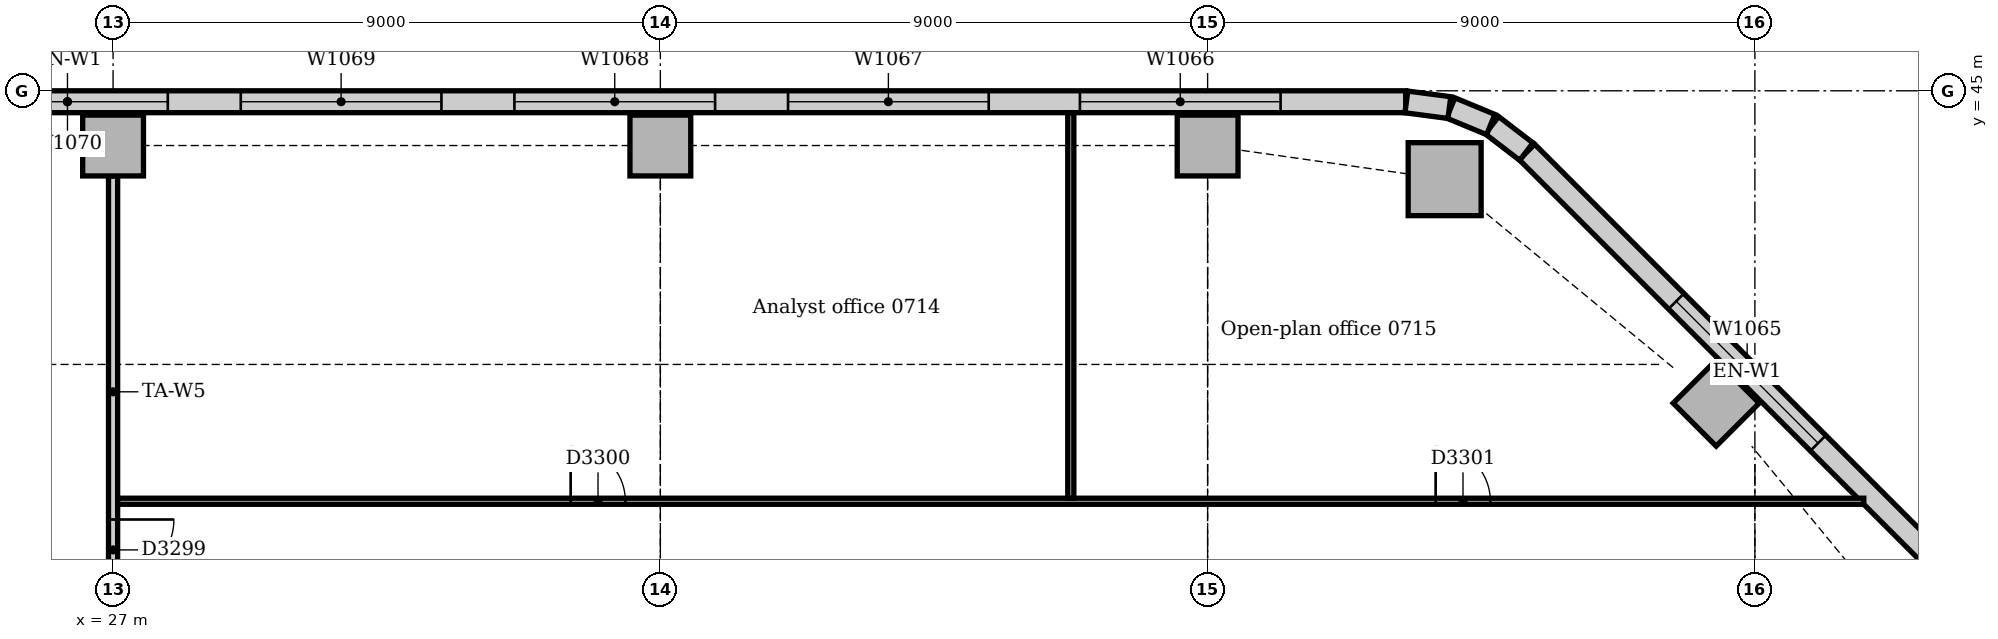
"""IFC4 building model, lengths in metres.
Left out: names, types, materials, properties, quantities, classifications, styles, units other than length and angle.
Written with IfcOpenShell. Run it as: python <this file> out.ifc"""

import sys

from ifc_helpers import new_model, si_unit, direction, frame, frame_2d, origin, origin_2d, place, context, subcontext, project, spatial, rectangle, extrude, element, fill, save


model = new_model("IFC4")
c1 = context("Model", 3, precision=1e-05, world=origin(), true_north=direction((0.0, 1.0)))
c2 = subcontext(c1, "Body", "Model", "MODEL_VIEW")
j1 = project(units=[si_unit("LENGTHUNIT", "METRE"), si_unit("PLANEANGLEUNIT", "RADIAN")], contexts=[c1])
p1 = place(None, origin())
s1 = spatial("IfcSite", under=j1, at=p1, CompositionType="ELEMENT")
p2 = place(p1, origin())
s2 = spatial("IfcBuilding", under=s1, at=p2, CompositionType="ELEMENT")
p3 = place(p2, frame((0.0, 0.0, 34.0)))
s3 = spatial("IfcBuildingStorey", under=s2, at=p3, CompositionType="ELEMENT", Elevation=34.0)
p4 = place(p3, frame((48.898, 43.547, 0.0), z_axis=(0.0, 0.0, 1.0), x_axis=(1.0, 0.0, 0.0)))
e1 = element("IfcColumn", 1, at=p4, inside=s3, PredefinedType="COLUMN", context=c2, shape_type="SweptSolid", body=[
    extrude(rectangle(XDim=1.2, YDim=1.2, at=origin_2d()), origin(), (0.0, 0.0, 1.0), 3.85),
])
for number, where, z_axis, x_axis in (
    (2, (53.364, 39.864, 0.0), (0.0, 0.0, 1.0), (0.707, 0.707, 0.0)),
    (3, (27.0, 44.1, 0.0), (0.0, 0.0, 1.0), (1.0, 0.0, 0.0)),
    (4, (36.0, 44.1, 0.0), (0.0, 0.0, 1.0), (1.0, 0.0, 0.0)),
    (5, (45.0, 44.1, 0.0), (0.0, 0.0, 1.0), (1.0, 0.0, 0.0)),
):
    element("IfcColumn", number, at=place(p3, frame(where, z_axis=z_axis, x_axis=x_axis)), inside=s3, PredefinedType="COLUMN", context=c2, shape_type="SweptSolid", body=[
        extrude(rectangle(XDim=1.0, YDim=1.0, at=origin_2d()), origin(), (0.0, 0.0, 1.0), 3.85),
    ])
p5 = place(p3, frame((57.494, 36.751, 0.0), z_axis=(0.0, 0.0, 1.0), x_axis=(-0.707106781187, 0.707106781187, 0.0)))
e6 = element("IfcWall", 6, at=p5, inside=s3, PredefinedType="STANDARD", context=c2, shape_type="SweptSolid", body=[
    extrude(rectangle(XDim=10.243, YDim=0.36, at=frame_2d((5.121, 0.0))), origin(), (0.0, 0.0, 1.0), 3.85),
])
p6 = place(p5, frame((3.471, 0.0, 0.9)))
e7 = element("IfcOpeningElement", 7, at=p6, cuts=e6, PredefinedType="OPENING", context=c2, shape_type="SweptSolid", body=[
    extrude(rectangle(XDim=3.3, YDim=1.6, at=frame_2d((1.65, 0.8))), frame((0.0, 0.19, 0.0), z_axis=(0.0, -1.0, 0.0), x_axis=(1.0, 0.0, 0.0)), (0.0, 0.0, 1.0), 0.38),
])
p7 = place(p3, frame((48.257, 44.82, 0.0), z_axis=(0.0, 0.0, 1.0), x_axis=(-1.0, 0.0, 0.0)))
e8 = element("IfcWall", 8, at=p7, inside=s3, PredefinedType="STANDARD", context=c2, shape_type="SweptSolid", body=[
    extrude(rectangle(XDim=44.015, YDim=0.36, at=frame_2d((22.007, 0.0))), origin(), (0.0, 0.0, 1.0), 3.85),
])
p8 = place(p7, frame((2.057, 0.0, 0.9)))
e9 = element("IfcOpeningElement", 9, at=p8, cuts=e8, PredefinedType="OPENING", context=c2, shape_type="SweptSolid", body=[
    extrude(rectangle(XDim=3.3, YDim=1.6, at=frame_2d((1.65, 0.8))), frame((0.0, 0.19, 0.0), z_axis=(0.0, -1.0, 0.0), x_axis=(1.0, 0.0, 0.0)), (0.0, 0.0, 1.0), 0.38),
])
p9 = place(p7, frame((6.857, 0.0, 0.9)))
e10 = element("IfcOpeningElement", 10, at=p9, cuts=e8, PredefinedType="OPENING", context=c2, shape_type="SweptSolid", body=[
    extrude(rectangle(XDim=3.3, YDim=1.6, at=frame_2d((1.65, 0.8))), frame((0.0, 0.19, 0.0), z_axis=(0.0, -1.0, 0.0), x_axis=(1.0, 0.0, 0.0)), (0.0, 0.0, 1.0), 0.38),
])
p10 = place(p7, frame((11.357, 0.0, 0.9)))
e11 = element("IfcOpeningElement", 11, at=p10, cuts=e8, PredefinedType="OPENING", context=c2, shape_type="SweptSolid", body=[
    extrude(rectangle(XDim=3.3, YDim=1.6, at=frame_2d((1.65, 0.8))), frame((0.0, 0.19, 0.0), z_axis=(0.0, -1.0, 0.0), x_axis=(1.0, 0.0, 0.0)), (0.0, 0.0, 1.0), 0.38),
])
p11 = place(p7, frame((15.857, 0.0, 0.9)))
e12 = element("IfcOpeningElement", 12, at=p11, cuts=e8, PredefinedType="OPENING", context=c2, shape_type="SweptSolid", body=[
    extrude(rectangle(XDim=3.3, YDim=1.6, at=frame_2d((1.65, 0.8))), frame((0.0, 0.19, 0.0), z_axis=(0.0, -1.0, 0.0), x_axis=(1.0, 0.0, 0.0)), (0.0, 0.0, 1.0), 0.38),
])
p12 = place(p7, frame((20.357, 0.0, 0.9)))
e13 = element("IfcOpeningElement", 13, at=p12, cuts=e8, PredefinedType="OPENING", context=c2, shape_type="SweptSolid", body=[
    extrude(rectangle(XDim=3.3, YDim=1.6, at=frame_2d((1.65, 0.8))), frame((0.0, 0.19, 0.0), z_axis=(0.0, -1.0, 0.0), x_axis=(1.0, 0.0, 0.0)), (0.0, 0.0, 1.0), 0.38),
])
p13 = place(p7, frame((25.957, 0.0, 0.9)))
e14 = element("IfcOpeningElement", 14, at=p13, cuts=e8, PredefinedType="OPENING", context=c2, shape_type="SweptSolid", body=[
    extrude(rectangle(XDim=1.8, YDim=1.6, at=frame_2d((0.9, 0.8))), frame((0.0, 0.19, 0.0), z_axis=(0.0, -1.0, 0.0), x_axis=(1.0, 0.0, 0.0)), (0.0, 0.0, 1.0), 0.38),
])
p14 = place(p7, frame((29.357, 0.0, 0.9)))
e15 = element("IfcOpeningElement", 15, at=p14, cuts=e8, PredefinedType="OPENING", context=c2, shape_type="SweptSolid", body=[
    extrude(rectangle(XDim=3.3, YDim=1.6, at=frame_2d((1.65, 0.8))), frame((0.0, 0.19, 0.0), z_axis=(0.0, -1.0, 0.0), x_axis=(1.0, 0.0, 0.0)), (0.0, 0.0, 1.0), 0.38),
])
p15 = place(p7, frame((33.857, 0.0, 0.9)))
e16 = element("IfcOpeningElement", 16, at=p15, cuts=e8, PredefinedType="OPENING", context=c2, shape_type="SweptSolid", body=[
    extrude(rectangle(XDim=3.3, YDim=1.6, at=frame_2d((1.65, 0.8))), frame((0.0, 0.19, 0.0), z_axis=(0.0, -1.0, 0.0), x_axis=(1.0, 0.0, 0.0)), (0.0, 0.0, 1.0), 0.38),
])
p16 = place(p7, frame((38.357, 0.0, 0.9)))
e17 = element("IfcOpeningElement", 17, at=p16, cuts=e8, PredefinedType="OPENING", context=c2, shape_type="SweptSolid", body=[
    extrude(rectangle(XDim=3.3, YDim=1.6, at=frame_2d((1.65, 0.8))), frame((0.0, 0.19, 0.0), z_axis=(0.0, -1.0, 0.0), x_axis=(1.0, 0.0, 0.0)), (0.0, 0.0, 1.0), 0.38),
])
p17 = place(p3, frame((50.241, 44.0, 0.0), z_axis=(0.0, 0.0, 1.0), x_axis=(-0.793321924995, 0.608802368033, 0.0)))
e18 = element("IfcWall", 18, at=p17, inside=s3, PredefinedType="STANDARD", context=c2, shape_type="SweptSolid", body=[
    extrude(rectangle(XDim=0.713, YDim=0.36, at=frame_2d((0.357, 0.0))), origin(), (0.0, 0.0, 1.0), 3.85),
])
for number, where, z_axis, x_axis in (
    (19, (49.656, 44.445, 0.0), (0.0, 0.0, 1.0), (-0.924, 0.383, 0.0)),
    (20, (48.976, 44.724, 0.0), (0.0, 0.0, 1.0), (-0.991, 0.131, 0.0)),
):
    element("IfcWall", number, at=place(p3, frame(where, z_axis=z_axis, x_axis=x_axis)), inside=s3, PredefinedType="STANDARD", context=c2, shape_type="SweptSolid", body=[
        extrude(rectangle(XDim=0.713, YDim=0.36, at=frame_2d((0.356, 0.0))), origin(), (0.0, 0.0, 1.0), 3.85),
    ])
p18 = place(p3, frame((27.0, 36.5, 0.0), z_axis=(0.0, 0.0, 1.0), x_axis=(0.0, 1.0, 0.0)))
e21 = element("IfcWall", 21, at=p18, inside=s3, PredefinedType="PARTITIONING", context=c2, shape_type="SweptSolid", body=[
    extrude(rectangle(XDim=7.1, YDim=0.15, at=frame_2d((3.55, 0.0))), origin(), (0.0, 0.0, 1.0), 3.158),
])
p19 = place(p18, frame((0.45, 0.0, 0.0)))
e22 = element("IfcOpeningElement", 22, at=p19, cuts=e21, PredefinedType="OPENING", context=c2, shape_type="SweptSolid", body=[
    extrude(rectangle(XDim=1.0, YDim=2.1, at=frame_2d((0.5, 1.05))), frame((0.0, 0.085, 0.0), z_axis=(0.0, -1.0, 0.0), x_axis=(1.0, 0.0, 0.0)), (0.0, 0.0, 1.0), 0.17),
])
p20 = place(p3, frame((27.075, 38.25, 0.0), z_axis=(0.0, 0.0, 1.0), x_axis=(1.0, 0.0, 0.0)))
e23 = element("IfcWall", 23, at=p20, inside=s3, PredefinedType="PARTITIONING", context=c2, shape_type="SweptSolid", body=[
    extrude(rectangle(XDim=28.716, YDim=0.1, at=frame_2d((14.358, 0.0))), origin(), (0.0, 0.0, 1.0), 3.85),
])
p21 = place(p20, frame((7.45, 0.0, 0.0)))
e24 = element("IfcOpeningElement", 24, at=p21, cuts=e23, PredefinedType="OPENING", context=c2, shape_type="SweptSolid", body=[
    extrude(rectangle(XDim=0.9, YDim=2.1, at=frame_2d((0.45, 1.05))), frame((0.0, 0.06, 0.0), z_axis=(0.0, -1.0, 0.0), x_axis=(1.0, 0.0, 0.0)), (0.0, 0.0, 1.0), 0.12),
])
p22 = place(p20, frame((21.675, 0.0, 0.0)))
e25 = element("IfcOpeningElement", 25, at=p22, cuts=e23, PredefinedType="OPENING", context=c2, shape_type="SweptSolid", body=[
    extrude(rectangle(XDim=0.9, YDim=2.1, at=frame_2d((0.45, 1.05))), frame((0.0, 0.06, 0.0), z_axis=(0.0, -1.0, 0.0), x_axis=(1.0, 0.0, 0.0)), (0.0, 0.0, 1.0), 0.12),
])
p23 = place(p3, frame((42.75, 38.3, 0.0), z_axis=(0.0, 0.0, 1.0), x_axis=(0.0, 1.0, 0.0)))
e26 = element("IfcWall", 26, at=p23, inside=s3, PredefinedType="PARTITIONING", context=c2, shape_type="SweptSolid", body=[
    extrude(rectangle(XDim=6.34, YDim=0.1, at=frame_2d((3.17, 0.0))), origin(), (0.0, 0.0, 1.0), 3.85),
])
p24 = place(p6, origin())
e27 = element("IfcWindow", 27, at=p24, inside=s3, PartitioningType="SINGLE_PANEL", PredefinedType="WINDOW", context=c2, shape_type="SweptSolid", body=[
    extrude(rectangle(XDim=3.3, YDim=1.6, at=frame_2d((1.65, 0.8))), frame((0.0, 0.13, 0.0), z_axis=(0.0, -1.0, 0.0), x_axis=(1.0, 0.0, 0.0)), (0.0, 0.0, 1.0), 0.06),
])
fill(e7, e27)
p25 = place(p8, origin())
e28 = element("IfcWindow", 28, at=p25, inside=s3, PartitioningType="SINGLE_PANEL", PredefinedType="WINDOW", context=c2, shape_type="SweptSolid", body=[
    extrude(rectangle(XDim=3.3, YDim=1.6, at=frame_2d((1.65, 0.8))), frame((0.0, 0.13, 0.0), z_axis=(0.0, -1.0, 0.0), x_axis=(1.0, 0.0, 0.0)), (0.0, 0.0, 1.0), 0.06),
])
fill(e9, e28)
p26 = place(p9, origin())
e29 = element("IfcWindow", 29, at=p26, inside=s3, PartitioningType="SINGLE_PANEL", PredefinedType="WINDOW", context=c2, shape_type="SweptSolid", body=[
    extrude(rectangle(XDim=3.3, YDim=1.6, at=frame_2d((1.65, 0.8))), frame((0.0, 0.13, 0.0), z_axis=(0.0, -1.0, 0.0), x_axis=(1.0, 0.0, 0.0)), (0.0, 0.0, 1.0), 0.06),
])
fill(e10, e29)
p27 = place(p10, origin())
e30 = element("IfcWindow", 30, at=p27, inside=s3, PartitioningType="SINGLE_PANEL", PredefinedType="WINDOW", context=c2, shape_type="SweptSolid", body=[
    extrude(rectangle(XDim=3.3, YDim=1.6, at=frame_2d((1.65, 0.8))), frame((0.0, 0.13, 0.0), z_axis=(0.0, -1.0, 0.0), x_axis=(1.0, 0.0, 0.0)), (0.0, 0.0, 1.0), 0.06),
])
fill(e11, e30)
p28 = place(p11, origin())
e31 = element("IfcWindow", 31, at=p28, inside=s3, PartitioningType="SINGLE_PANEL", PredefinedType="WINDOW", context=c2, shape_type="SweptSolid", body=[
    extrude(rectangle(XDim=3.3, YDim=1.6, at=frame_2d((1.65, 0.8))), frame((0.0, 0.13, 0.0), z_axis=(0.0, -1.0, 0.0), x_axis=(1.0, 0.0, 0.0)), (0.0, 0.0, 1.0), 0.06),
])
fill(e12, e31)
p29 = place(p12, origin())
e32 = element("IfcWindow", 32, at=p29, inside=s3, PartitioningType="SINGLE_PANEL", PredefinedType="WINDOW", context=c2, shape_type="SweptSolid", body=[
    extrude(rectangle(XDim=3.3, YDim=1.6, at=frame_2d((1.65, 0.8))), frame((0.0, 0.13, 0.0), z_axis=(0.0, -1.0, 0.0), x_axis=(1.0, 0.0, 0.0)), (0.0, 0.0, 1.0), 0.06),
])
fill(e13, e32)
p30 = place(p19, frame((1.0, 0.0, 0.0), z_axis=(0.0, 0.0, 1.0), x_axis=(-1.0, 0.0, 0.0)))
e33 = element("IfcDoor", 33, at=p30, inside=s3, OperationType="SINGLE_SWING_LEFT", PredefinedType="DOOR", context=c2, shape_type="SweptSolid", body=[
    extrude(rectangle(XDim=1.0, YDim=2.1, at=frame_2d((0.5, 1.05))), frame((0.0, 0.025, 0.0), z_axis=(0.0, -1.0, 0.0), x_axis=(1.0, 0.0, 0.0)), (0.0, 0.0, 1.0), 0.05),
])
fill(e22, e33)
p31 = place(p21, origin())
e34 = element("IfcDoor", 34, at=p31, inside=s3, OperationType="SINGLE_SWING_LEFT", PredefinedType="DOOR", context=c2, shape_type="SweptSolid", body=[
    extrude(rectangle(XDim=0.9, YDim=2.1, at=frame_2d((0.45, 1.05))), frame((0.0, 0.025, 0.0), z_axis=(0.0, -1.0, 0.0), x_axis=(1.0, 0.0, 0.0)), (0.0, 0.0, 1.0), 0.05),
])
fill(e24, e34)
p32 = place(p22, origin())
e35 = element("IfcDoor", 35, at=p32, inside=s3, OperationType="SINGLE_SWING_LEFT", PredefinedType="DOOR", context=c2, shape_type="SweptSolid", body=[
    extrude(rectangle(XDim=0.9, YDim=2.1, at=frame_2d((0.45, 1.05))), frame((0.0, 0.025, 0.0), z_axis=(0.0, -1.0, 0.0), x_axis=(1.0, 0.0, 0.0)), (0.0, 0.0, 1.0), 0.05),
])
fill(e25, e35)
save(model, sys.argv[1])
